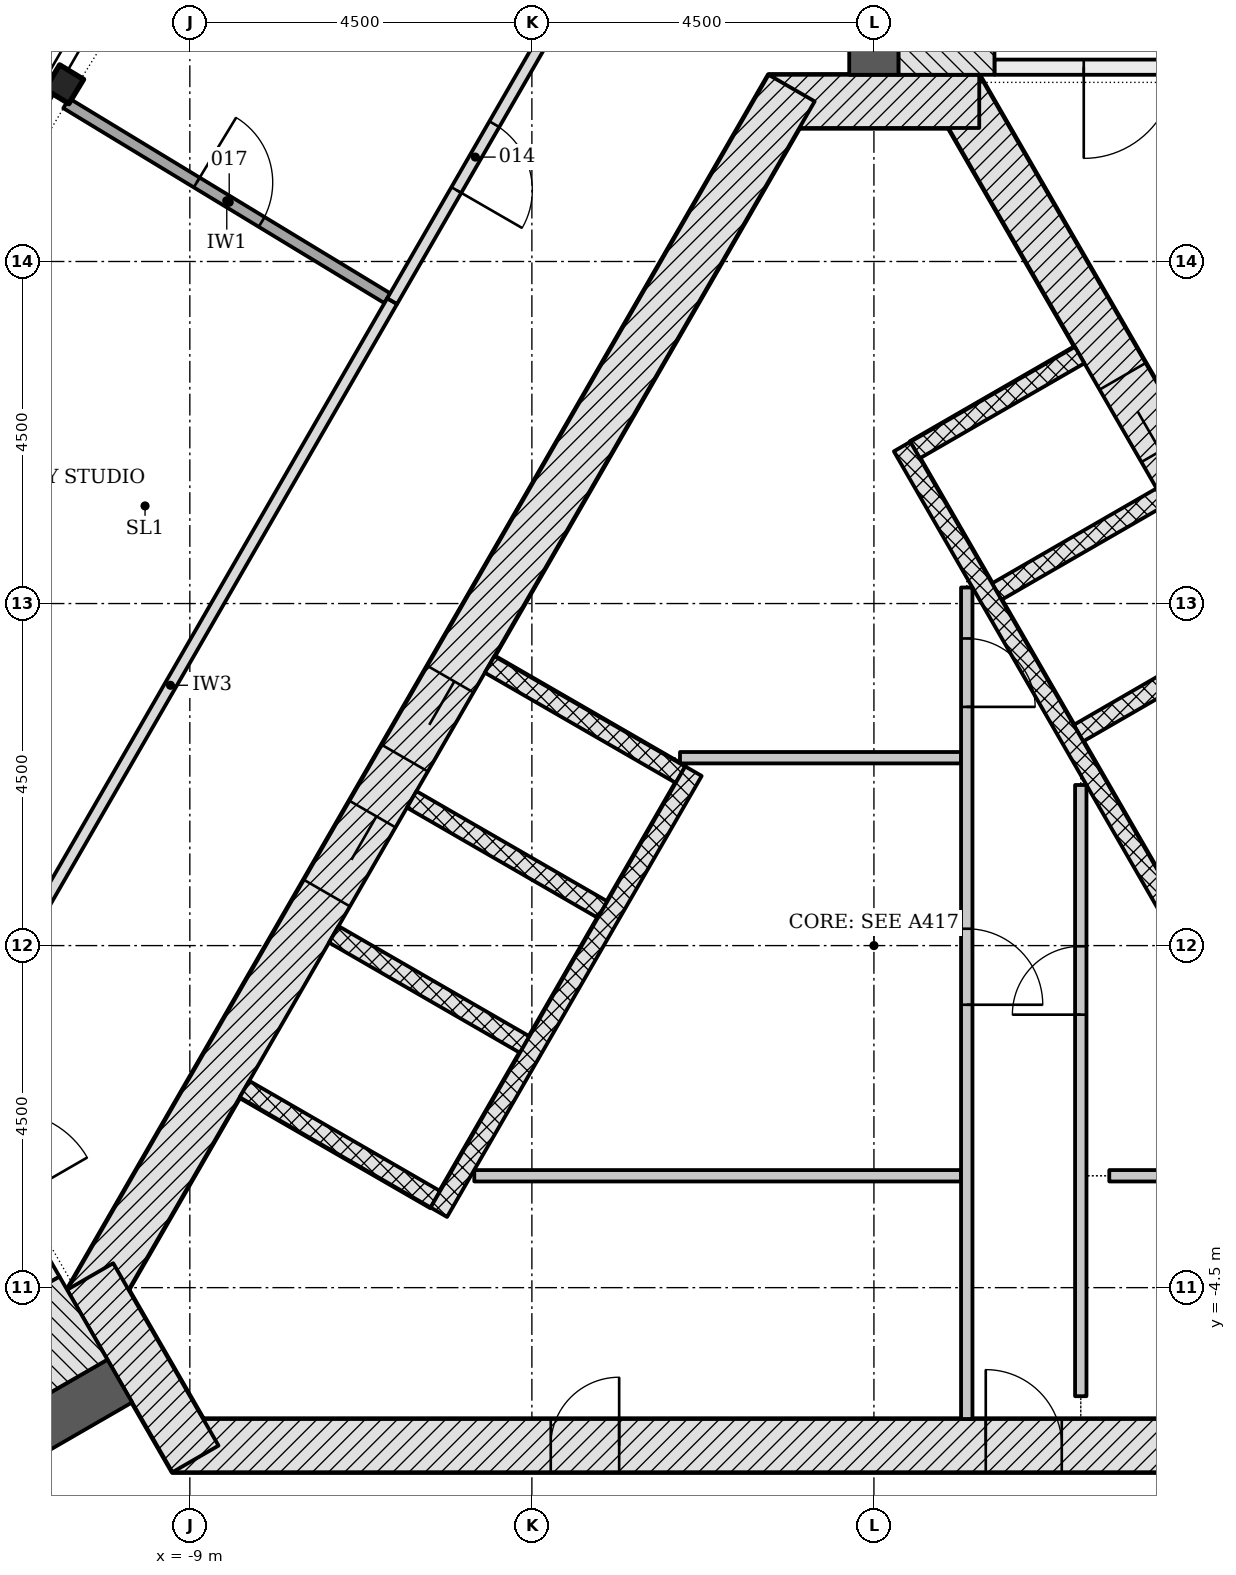
"""IFC4 building model, lengths in metres.
Left out: names, types, materials, properties, quantities, classifications, styles, units other than length and angle.
Written with IfcOpenShell. Run it as: python <this file> out.ifc"""

import sys

from ifc_helpers import new_model, si_unit, direction, frame, frame_2d, origin, origin_2d, place, context, subcontext, project, spatial, rectangle, i_section, extrude, element, fill, save


model = new_model("IFC4")
c1 = context("Model", 3, precision=1e-05, world=origin(), true_north=direction((0.0, 1.0)))
c2 = subcontext(c1, "Body", "Model", "MODEL_VIEW")
j1 = project(units=[si_unit("LENGTHUNIT", "METRE"), si_unit("PLANEANGLEUNIT", "RADIAN")], contexts=[c1])
p1 = place(None, origin())
s1 = spatial("IfcSite", under=j1, at=p1, CompositionType="ELEMENT")
p2 = place(p1, origin())
s2 = spatial("IfcBuilding", under=s1, at=p2, CompositionType="ELEMENT")
p3 = place(p2, frame((0.0, 0.0, 222.0)))
s3 = spatial("IfcBuildingStorey", under=s2, at=p3, CompositionType="ELEMENT", Elevation=222.0)
p4 = place(p3, frame((-9.229, -6.578, -0.2), z_axis=(0.0, 0.0, 1.0), x_axis=(1.0, 0.0, 0.0)))
e1 = element("IfcWall", 1, at=p4, inside=s3, PredefinedType="SHEAR", context=c2, shape_type="SweptSolid", body=[
    extrude(rectangle(XDim=18.458, YDim=0.7, at=frame_2d((9.229, 0.0))), origin(), (0.0, 0.0, 1.0), 3.6),
])
p5 = place(p4, frame((10.7, 0.0, 0.2)))
e2 = element("IfcOpeningElement", 2, at=p5, cuts=e1, PredefinedType="OPENING", context=c2, shape_type="SweptSolid", body=[
    extrude(rectangle(XDim=1.0, YDim=2.1, at=frame_2d((0.5, 1.05))), frame((0.0, 0.36, 0.0), z_axis=(0.0, -1.0, 0.0), x_axis=(1.0, 0.0, 0.0)), (0.0, 0.0, 1.0), 0.72),
])
p6 = place(p4, frame((4.977, 0.0, 0.2)))
e3 = element("IfcOpeningElement", 3, at=p6, cuts=e1, PredefinedType="OPENING", context=c2, shape_type="SweptSolid", body=[
    extrude(rectangle(XDim=0.9, YDim=2.1, at=frame_2d((0.45, 1.05))), frame((0.0, 0.36, 0.0), z_axis=(0.0, -1.0, 0.0), x_axis=(1.0, 0.0, 0.0)), (0.0, 0.0, 1.0), 0.72),
])
p7 = place(p4, frame((14.552, 0.0, 0.2)))
e4 = element("IfcOpeningElement", 4, at=p7, cuts=e1, PredefinedType="OPENING", context=c2, shape_type="SweptSolid", body=[
    extrude(rectangle(XDim=0.9, YDim=2.1, at=frame_2d((0.45, 1.05))), frame((0.0, 0.36, 0.0), z_axis=(0.0, -1.0, 0.0), x_axis=(1.0, 0.0, 0.0)), (0.0, 0.0, 1.0), 0.72),
])
p8 = place(p3, frame((10.311, -4.703, -0.2), z_axis=(0.0, 0.0, 1.0), x_axis=(-0.500001446645, 0.866024568562, 0.0)))
e5 = element("IfcWall", 5, at=p8, inside=s3, PredefinedType="SHEAR", context=c2, shape_type="SweptSolid", body=[
    extrude(rectangle(XDim=18.458, YDim=0.7, at=frame_2d((9.229, 0.0))), origin(), (0.0, 0.0, 1.0), 3.6),
])
p9 = place(p8, frame((4.379, 0.0, 0.2)))
e6 = element("IfcOpeningElement", 6, at=p9, cuts=e5, PredefinedType="OPENING", context=c2, shape_type="SweptSolid", body=[
    extrude(rectangle(XDim=1.1, YDim=2.1, at=frame_2d((0.55, 1.05))), frame((0.0, 0.36, 0.0), z_axis=(0.0, -1.0, 0.0), x_axis=(1.0, 0.0, 0.0)), (0.0, 0.0, 1.0), 0.72),
])
p10 = place(p8, frame((6.529, 0.0, 0.2)))
e7 = element("IfcOpeningElement", 7, at=p10, cuts=e5, PredefinedType="OPENING", context=c2, shape_type="SweptSolid", body=[
    extrude(rectangle(XDim=1.1, YDim=2.1, at=frame_2d((0.55, 1.05))), frame((0.0, 0.36, 0.0), z_axis=(0.0, -1.0, 0.0), x_axis=(1.0, 0.0, 0.0)), (0.0, 0.0, 1.0), 0.72),
])
p11 = place(p8, frame((8.679, 0.0, 0.2)))
e8 = element("IfcOpeningElement", 8, at=p11, cuts=e5, PredefinedType="OPENING", context=c2, shape_type="SweptSolid", body=[
    extrude(rectangle(XDim=1.1, YDim=2.1, at=frame_2d((0.55, 1.05))), frame((0.0, 0.36, 0.0), z_axis=(0.0, -1.0, 0.0), x_axis=(1.0, 0.0, 0.0)), (0.0, 0.0, 1.0), 0.72),
])
p12 = place(p8, frame((10.829, 0.0, 0.2)))
e9 = element("IfcOpeningElement", 9, at=p12, cuts=e5, PredefinedType="OPENING", context=c2, shape_type="SweptSolid", body=[
    extrude(rectangle(XDim=1.1, YDim=2.1, at=frame_2d((0.55, 1.05))), frame((0.0, 0.36, 0.0), z_axis=(0.0, -1.0, 0.0), x_axis=(1.0, 0.0, 0.0)), (0.0, 0.0, 1.0), 0.72),
])
p13 = place(p8, frame((12.979, 0.0, 0.2)))
e10 = element("IfcOpeningElement", 10, at=p13, cuts=e5, PredefinedType="OPENING", context=c2, shape_type="SweptSolid", body=[
    extrude(rectangle(XDim=1.1, YDim=2.1, at=frame_2d((0.55, 1.05))), frame((0.0, 0.36, 0.0), z_axis=(0.0, -1.0, 0.0), x_axis=(1.0, 0.0, 0.0)), (0.0, 0.0, 1.0), 0.72),
])
p14 = place(p3, frame((1.386, 11.106, -0.2), z_axis=(0.0, 0.0, 1.0), x_axis=(-1.0, 0.0, 0.0)))
e11 = element("IfcWall", 11, at=p14, inside=s3, PredefinedType="SHEAR", context=c2, shape_type="SweptSolid", body=[
    extrude(rectangle(XDim=2.771, YDim=0.7, at=frame_2d((1.386, 0.0))), origin(), (0.0, 0.0, 1.0), 3.6),
])
p15 = place(p3, frame((-1.083, 11.281, -0.2), z_axis=(0.0, 0.0, 1.0), x_axis=(-0.500001446645, -0.866024568562, 0.0)))
e12 = element("IfcWall", 12, at=p15, inside=s3, PredefinedType="SHEAR", context=c2, shape_type="SweptSolid", body=[
    extrude(rectangle(XDim=18.458, YDim=0.7, at=frame_2d((9.229, 0.0))), origin(), (0.0, 0.0, 1.0), 3.6),
])
p16 = place(p15, frame((8.979, 0.0, 0.2)))
e13 = element("IfcOpeningElement", 13, at=p16, cuts=e12, PredefinedType="OPENING", context=c2, shape_type="SweptSolid", body=[
    extrude(rectangle(XDim=1.2, YDim=2.1, at=frame_2d((0.6, 1.05))), frame((0.0, 0.36, 0.0), z_axis=(0.0, -1.0, 0.0), x_axis=(1.0, 0.0, 0.0)), (0.0, 0.0, 1.0), 0.72),
])
p17 = place(p15, frame((11.029, 0.0, 0.2)))
e14 = element("IfcOpeningElement", 14, at=p17, cuts=e12, PredefinedType="OPENING", context=c2, shape_type="SweptSolid", body=[
    extrude(rectangle(XDim=1.2, YDim=2.1, at=frame_2d((0.6, 1.05))), frame((0.0, 0.36, 0.0), z_axis=(0.0, -1.0, 0.0), x_axis=(1.0, 0.0, 0.0)), (0.0, 0.0, 1.0), 0.72),
])
p18 = place(p3, frame((-10.311, -4.353, -0.2), z_axis=(0.0, 0.0, 1.0), x_axis=(0.500042739161, -0.866000726912, 0.0)))
e15 = element("IfcWall", 15, at=p18, inside=s3, PredefinedType="SHEAR", context=c2, shape_type="SweptSolid", body=[
    extrude(rectangle(XDim=2.771, YDim=0.7, at=frame_2d((1.386, 0.0))), origin(), (0.0, 0.0, 1.0), 3.6),
])
for number, where, z_axis, x_axis in (
    (16, (0.0, 11.456, -0.2), (0.0, 0.0, 1.0), (0.0, 1.0, 0.0)),
    (17, (-9.922, -5.728, -0.2), (0.0, 0.0, 1.0), (-0.866, -0.5, 0.0)),
):
    element("IfcWall", number, at=place(p3, frame(where, z_axis=z_axis, x_axis=x_axis)), inside=s3, PredefinedType="SHEAR", context=c2, shape_type="SweptSolid", body=[
        extrude(rectangle(XDim=8.359, YDim=0.65, at=frame_2d((4.179, 0.0))), origin(), (0.0, 0.0, 1.0), 3.6),
    ])
p19 = place(p3, frame((-10.652, 11.332, -0.2), z_axis=(0.0, 0.0, 1.0), x_axis=(-0.519044082631, -0.854747471647, 0.0)))
e18 = element("IfcColumn", 18, at=p19, inside=s3, PredefinedType="COLUMN", context=c2, shape_type="SweptSolid", body=[
    extrude(i_section(OverallWidth=0.373, OverallDepth=0.368, WebThickness=0.015, FlangeThickness=0.024, FilletRadius=0.015, at=origin_2d()), origin(), (0.0, 0.0, 1.0), 3.6),
])
p20 = place(p3, frame((5.931, 2.183, -0.2), z_axis=(0.0, 0.0, 1.0), x_axis=(-0.866047370643, -0.499961950354, 0.0)))
e19 = element("IfcWall", 19, at=p20, inside=s3, PredefinedType="PARTITIONING", context=c2, shape_type="SweptSolid", body=[
    extrude(rectangle(XDim=2.5, YDim=0.25, at=frame_2d((1.25, 0.0))), origin(), (0.0, 0.0, 1.0), 3.6),
])
for number, where, z_axis, x_axis in (
    (20, (4.856, 4.045, -0.2), (0.0, 0.0, 1.0), (-0.866, -0.5, 0.0)),
    (21, (3.781, 5.907, -0.2), (0.0, 0.0, 1.0), (-0.866, -0.5, 0.0)),
    (22, (2.706, 7.769, -0.2), (0.0, 0.0, 1.0), (-0.866, -0.5, 0.0)),
):
    element("IfcWall", number, at=place(p3, frame(where, z_axis=z_axis, x_axis=x_axis)), inside=s3, PredefinedType="PARTITIONING", context=c2, shape_type="SweptSolid", body=[
        extrude(rectangle(XDim=2.5, YDim=0.25, at=frame_2d((1.25, 0.0))), origin(), (0.0, 0.0, 1.0), 3.6),
    ])
p21 = place(p3, frame((5.87, -2.961, 0.0), z_axis=(0.0, 0.0, 1.0), x_axis=(-0.50000615651, 0.866021849293, 0.0)))
e23 = element("IfcWall", 23, at=p21, inside=s3, PredefinedType="PARTITIONING", context=c2, shape_type="SweptSolid", body=[
    extrude(rectangle(XDim=11.0, YDim=0.25, at=frame_2d((5.5, 0.0))), origin(), (0.0, 0.0, 1.0), 3.4),
])
for number, where, z_axis, x_axis in (
    (24, (-5.056, 3.699, -0.2), (0.0, 0.0, 1.0), (0.866, -0.5, 0.0)),
    (25, (-6.081, 1.923, -0.2), (0.0, 0.0, 1.0), (0.866, -0.5, 0.0)),
    (26, (-7.106, 0.148, -0.2), (0.0, 0.0, 1.0), (0.866, -0.5, 0.0)),
    (27, (-8.281, -1.887, -0.2), (0.0, 0.0, 1.0), (0.866, -0.5, 0.0)),
):
    element("IfcWall", number, at=place(p3, frame(where, z_axis=z_axis, x_axis=x_axis)), inside=s3, PredefinedType="PARTITIONING", context=c2, shape_type="SweptSolid", body=[
        extrude(rectangle(XDim=2.9, YDim=0.25, at=frame_2d((1.45, 0.0))), origin(), (0.0, 0.0, 1.0), 3.6),
    ])
p22 = place(p3, frame((-2.374, 2.294, 0.0), z_axis=(0.0, 0.0, 1.0), x_axis=(-0.500003174267, -0.866023571113, 0.0)))
e28 = element("IfcWall", 28, at=p22, inside=s3, PredefinedType="PARTITIONING", context=c2, shape_type="SweptSolid", body=[
    extrude(rectangle(XDim=6.7, YDim=0.25, at=frame_2d((3.35, 0.0))), origin(), (0.0, 0.0, 1.0), 3.4),
])
p23 = place(p3, frame((-5.258, -3.028, 0.0), z_axis=(0.0, 0.0, 1.0), x_axis=(1.0, 0.0, 0.0)))
e29 = element("IfcWall", 29, at=p23, inside=s3, PredefinedType="PARTITIONING", context=c2, shape_type="SweptSolid", body=[
    extrude(rectangle(XDim=6.404, YDim=0.15, at=frame_2d((3.202, 0.0))), origin(), (0.0, 0.0, 1.0), 3.4),
])
p24 = place(p3, frame((-2.551, 2.472, 0.0), z_axis=(0.0, 0.0, 1.0), x_axis=(1.0, 0.0, 0.0)))
e30 = element("IfcWall", 30, at=p24, inside=s3, PredefinedType="PARTITIONING", context=c2, shape_type="SweptSolid", body=[
    extrude(rectangle(XDim=3.698, YDim=0.15, at=frame_2d((1.849, 0.0))), origin(), (0.0, 0.0, 1.0), 3.4),
])
p25 = place(p3, frame((1.221, 4.711, 0.0), z_axis=(0.0, 0.0, 1.0), x_axis=(0.0, -1.0, 0.0)))
e31 = element("IfcWall", 31, at=p25, inside=s3, PredefinedType="PARTITIONING", context=c2, shape_type="SweptSolid", body=[
    extrude(rectangle(XDim=10.939, YDim=0.15, at=frame_2d((5.47, 0.0))), origin(), (0.0, 0.0, 1.0), 3.4),
])
p26 = place(p25, frame((4.489, 0.0, 0.0)))
e32 = element("IfcOpeningElement", 32, at=p26, cuts=e31, PredefinedType="OPENING", context=c2, shape_type="SweptSolid", body=[
    extrude(rectangle(XDim=1.0, YDim=2.1, at=frame_2d((0.5, 1.05))), frame((0.0, 0.085, 0.0), z_axis=(0.0, -1.0, 0.0), x_axis=(1.0, 0.0, 0.0)), (0.0, 0.0, 1.0), 0.17),
])
p27 = place(p25, frame((0.671, 0.0, 0.0)))
e33 = element("IfcOpeningElement", 33, at=p27, cuts=e31, PredefinedType="OPENING", context=c2, shape_type="SweptSolid", body=[
    extrude(rectangle(XDim=0.9, YDim=2.1, at=frame_2d((0.45, 1.05))), frame((0.0, 0.085, 0.0), z_axis=(0.0, -1.0, 0.0), x_axis=(1.0, 0.0, 0.0)), (0.0, 0.0, 1.0), 0.17),
])
p28 = place(p3, frame((2.721, -5.928, 0.0), z_axis=(0.0, 0.0, 1.0), x_axis=(0.0, 1.0, 0.0)))
e34 = element("IfcWall", 34, at=p28, inside=s3, PredefinedType="PARTITIONING", context=c2, shape_type="SweptSolid", body=[
    extrude(rectangle(XDim=8.041, YDim=0.15, at=frame_2d((4.021, 0.0))), origin(), (0.0, 0.0, 1.0), 3.4),
])
p29 = place(p28, frame((5.02, 0.0, 0.0)))
e35 = element("IfcOpeningElement", 35, at=p29, cuts=e34, PredefinedType="OPENING", context=c2, shape_type="SweptSolid", body=[
    extrude(rectangle(XDim=0.9, YDim=2.1, at=frame_2d((0.45, 1.05))), frame((0.0, 0.085, 0.0), z_axis=(0.0, -1.0, 0.0), x_axis=(1.0, 0.0, 0.0)), (0.0, 0.0, 1.0), 0.17),
])
p30 = place(p3, frame((3.096, -3.028, 0.0), z_axis=(0.0, 0.0, 1.0), x_axis=(1.0, 0.0, 0.0)))
e36 = element("IfcWall", 36, at=p30, inside=s3, PredefinedType="PARTITIONING", context=c2, shape_type="SweptSolid", body=[
    extrude(rectangle(XDim=5.544, YDim=0.15, at=frame_2d((2.772, 0.0))), origin(), (0.0, 0.0, 1.0), 3.4),
])
p31 = place(p3, frame((5.135, 11.556, -0.2), z_axis=(0.0, 0.0, 1.0), x_axis=(-1.0, 0.0, 0.0)))
e37 = element("IfcWall", 37, at=p31, inside=s3, PredefinedType="SHEAR", context=c2, shape_type="SweptSolid", body=[
    extrude(rectangle(XDim=3.55, YDim=0.2, at=frame_2d((1.775, 0.0))), origin(), (0.0, 0.0, 1.0), 3.6),
])
p32 = place(p31, frame((1.175, 0.0, 0.2)))
e38 = element("IfcOpeningElement", 38, at=p32, cuts=e37, PredefinedType="OPENING", context=c2, shape_type="SweptSolid", body=[
    extrude(rectangle(XDim=1.2, YDim=2.1, at=frame_2d((0.6, 1.05))), frame((0.0, 0.11, 0.0), z_axis=(0.0, -1.0, 0.0), x_axis=(1.0, 0.0, 0.0)), (0.0, 0.0, 1.0), 0.22),
])
p33 = place(p3, frame((0.955, 11.456, -0.2), z_axis=(0.0, 0.0, 1.0), x_axis=(0.0, 1.0, 0.0)))
e39 = element("IfcWall", 39, at=p33, inside=s3, PredefinedType="SHEAR", context=c2, shape_type="SweptSolid", body=[
    extrude(rectangle(XDim=7.2, YDim=1.261, at=frame_2d((3.6, 0.0))), origin(), (0.0, 0.0, 1.0), 3.6),
])
p34 = place(p3, frame((-12.576, -1.331, -0.2), z_axis=(0.0, 0.0, 1.0), x_axis=(0.499970499736, -0.8660424351, 0.0)))
e40 = element("IfcWall", 40, at=p34, inside=s3, PredefinedType="SHEAR", context=c2, shape_type="SweptSolid", body=[
    extrude(rectangle(XDim=3.55, YDim=0.2, at=frame_2d((1.775, 0.0))), origin(), (0.0, 0.0, 1.0), 3.6),
])
p35 = place(p34, frame((1.175, 0.0, 0.2)))
e41 = element("IfcOpeningElement", 41, at=p35, cuts=e40, PredefinedType="OPENING", context=c2, shape_type="SweptSolid", body=[
    extrude(rectangle(XDim=1.2, YDim=2.1, at=frame_2d((0.6, 1.05))), frame((0.0, 0.11, 0.0), z_axis=(0.0, -1.0, 0.0), x_axis=(1.0, 0.0, 0.0)), (0.0, 0.0, 1.0), 0.22),
])
p36 = place(p3, frame((-10.399, -4.901, -0.2), z_axis=(0.0, 0.0, 1.0), x_axis=(-0.866018442252, -0.500012057535, 0.0)))
e42 = element("IfcWall", 42, at=p36, inside=s3, PredefinedType="SHEAR", context=c2, shape_type="SweptSolid", body=[
    extrude(rectangle(XDim=7.2, YDim=1.261, at=frame_2d((3.6, 0.0))), origin(), (0.0, 0.0, 1.0), 3.6),
])
p37 = place(p3, frame((-6.338, 8.478, 0.0), z_axis=(0.0, 0.0, 1.0), x_axis=(-0.499993497815, -0.86602915779, 0.0)))
e43 = element("IfcWall", 43, at=p37, inside=s3, PredefinedType="PARTITIONING", context=c2, shape_type="SweptSolid", body=[
    extrude(rectangle(XDim=11.67, YDim=0.15, at=frame_2d((5.835, 0.0))), origin(), (0.0, 0.0, 1.0), 2.852),
])
p38 = place(p3, frame((-10.626, 11.082, 0.0), z_axis=(0.0, 0.0, 1.0), x_axis=(0.854742891139, -0.519051625609, 0.0)))
e44 = element("IfcWall", 44, at=p38, inside=s3, PredefinedType="PARTITIONING", context=c2, shape_type="SweptSolid", body=[
    extrude(rectangle(XDim=4.941, YDim=0.15, at=frame_2d((2.471, 0.0))), origin(), (0.0, 0.0, 1.0), 3.4),
])
p39 = place(p38, frame((2.008, 0.0, 0.0)))
e45 = element("IfcOpeningElement", 45, at=p39, cuts=e44, PredefinedType="OPENING", context=c2, shape_type="SweptSolid", body=[
    extrude(rectangle(XDim=1.0, YDim=2.1, at=frame_2d((0.5, 1.05))), frame((0.0, 0.085, 0.0), z_axis=(0.0, -1.0, 0.0), x_axis=(1.0, 0.0, 0.0)), (0.0, 0.0, 1.0), 0.17),
])
p40 = place(p3, frame((-4.15, 12.269, 0.0), z_axis=(0.0, 0.0, 1.0), x_axis=(-0.499996027077, -0.86602769754, 0.0)))
e46 = element("IfcWall", 46, at=p40, inside=s3, PredefinedType="PARTITIONING", context=c2, shape_type="SweptSolid", body=[
    extrude(rectangle(XDim=4.377, YDim=0.15, at=frame_2d((2.189, 0.0))), origin(), (0.0, 0.0, 1.0), 2.852),
])
p41 = place(p40, frame((1.689, 0.0, 0.0)))
e47 = element("IfcOpeningElement", 47, at=p41, cuts=e46, PredefinedType="OPENING", context=c2, shape_type="SweptSolid", body=[
    extrude(rectangle(XDim=1.0, YDim=2.1, at=frame_2d((0.5, 1.05))), frame((0.0, 0.085, 0.0), z_axis=(0.0, -1.0, 0.0), x_axis=(1.0, 0.0, 0.0)), (0.0, 0.0, 1.0), 0.17),
])
p42 = place(p13, origin())
e48 = element("IfcDoor", 48, at=p42, inside=s3, OperationType="DOUBLE_DOOR_SLIDING", PredefinedType="DOOR", context=c2, shape_type="SweptSolid", body=[
    extrude(rectangle(XDim=1.1, YDim=2.1, at=frame_2d((0.55, 1.05))), frame((0.0, 0.025, 0.0), z_axis=(0.0, -1.0, 0.0), x_axis=(1.0, 0.0, 0.0)), (0.0, 0.0, 1.0), 0.05),
])
fill(e10, e48)
p43 = place(p16, origin())
e49 = element("IfcDoor", 49, at=p43, inside=s3, OperationType="DOUBLE_DOOR_SLIDING", PredefinedType="DOOR", context=c2, shape_type="SweptSolid", body=[
    extrude(rectangle(XDim=1.2, YDim=2.1, at=frame_2d((0.6, 1.05))), frame((0.0, 0.025, 0.0), z_axis=(0.0, -1.0, 0.0), x_axis=(1.0, 0.0, 0.0)), (0.0, 0.0, 1.0), 0.05),
])
fill(e13, e49)
p44 = place(p17, origin())
e50 = element("IfcDoor", 50, at=p44, inside=s3, OperationType="DOUBLE_DOOR_SLIDING", PredefinedType="DOOR", context=c2, shape_type="SweptSolid", body=[
    extrude(rectangle(XDim=1.2, YDim=2.1, at=frame_2d((0.6, 1.05))), frame((0.0, 0.025, 0.0), z_axis=(0.0, -1.0, 0.0), x_axis=(1.0, 0.0, 0.0)), (0.0, 0.0, 1.0), 0.05),
])
fill(e14, e50)
p45 = place(p5, origin())
e51 = element("IfcDoor", 51, at=p45, inside=s3, OperationType="SINGLE_SWING_LEFT", PredefinedType="DOOR", context=c2, shape_type="SweptSolid", body=[
    extrude(rectangle(XDim=1.0, YDim=2.1, at=frame_2d((0.5, 1.05))), frame((0.0, 0.075, 0.0), z_axis=(0.0, -1.0, 0.0), x_axis=(1.0, 0.0, 0.0)), (0.0, 0.0, 1.0), 0.15),
])
fill(e2, e51)
p46 = place(p6, origin())
e52 = element("IfcDoor", 52, at=p46, inside=s3, OperationType="SINGLE_SWING_RIGHT", PredefinedType="DOOR", context=c2, shape_type="SweptSolid", body=[
    extrude(rectangle(XDim=0.9, YDim=2.1, at=frame_2d((0.45, 1.05))), frame((0.0, 0.075, 0.0), z_axis=(0.0, -1.0, 0.0), x_axis=(1.0, 0.0, 0.0)), (0.0, 0.0, 1.0), 0.15),
])
fill(e3, e52)
p47 = place(p26, origin())
e53 = element("IfcDoor", 53, at=p47, inside=s3, OperationType="SINGLE_SWING_RIGHT", PredefinedType="DOOR", context=c2, shape_type="SweptSolid", body=[
    extrude(rectangle(XDim=1.0, YDim=2.1, at=frame_2d((0.5, 1.05))), frame((0.0, 0.025, 0.0), z_axis=(0.0, -1.0, 0.0), x_axis=(1.0, 0.0, 0.0)), (0.0, 0.0, 1.0), 0.05),
])
fill(e32, e53)
p48 = place(p29, origin())
e54 = element("IfcDoor", 54, at=p48, inside=s3, OperationType="SINGLE_SWING_LEFT", PredefinedType="DOOR", context=c2, shape_type="SweptSolid", body=[
    extrude(rectangle(XDim=0.9, YDim=2.1, at=frame_2d((0.45, 1.05))), frame((0.0, 0.025, 0.0), z_axis=(0.0, -1.0, 0.0), x_axis=(1.0, 0.0, 0.0)), (0.0, 0.0, 1.0), 0.05),
])
fill(e35, e54)
p49 = place(p27, origin())
e55 = element("IfcDoor", 55, at=p49, inside=s3, OperationType="SINGLE_SWING_RIGHT", PredefinedType="DOOR", context=c2, shape_type="SweptSolid", body=[
    extrude(rectangle(XDim=0.9, YDim=2.1, at=frame_2d((0.45, 1.05))), frame((0.0, 0.025, 0.0), z_axis=(0.0, -1.0, 0.0), x_axis=(1.0, 0.0, 0.0)), (0.0, 0.0, 1.0), 0.05),
])
fill(e33, e55)
p50 = place(p32, origin())
e56 = element("IfcDoor", 56, at=p50, inside=s3, OperationType="SINGLE_SWING_RIGHT", PredefinedType="DOOR", context=c2, shape_type="SweptSolid", body=[
    extrude(rectangle(XDim=1.2, YDim=2.1, at=frame_2d((0.6, 1.05))), frame((0.0, 0.025, 0.0), z_axis=(0.0, -1.0, 0.0), x_axis=(1.0, 0.0, 0.0)), (0.0, 0.0, 1.0), 0.05),
])
fill(e38, e56)
p51 = place(p41, origin())
e57 = element("IfcDoor", 57, at=p51, inside=s3, OperationType="SINGLE_SWING_RIGHT", PredefinedType="DOOR", context=c2, shape_type="SweptSolid", body=[
    extrude(rectangle(XDim=1.0, YDim=2.1, at=frame_2d((0.5, 1.05))), frame((0.0, 0.025, 0.0), z_axis=(0.0, -1.0, 0.0), x_axis=(1.0, 0.0, 0.0)), (0.0, 0.0, 1.0), 0.05),
])
fill(e47, e57)
p52 = place(p39, origin())
e58 = element("IfcDoor", 58, at=p52, inside=s3, OperationType="SINGLE_SWING_LEFT", PredefinedType="DOOR", context=c2, shape_type="SweptSolid", body=[
    extrude(rectangle(XDim=1.0, YDim=2.1, at=frame_2d((0.5, 1.05))), frame((0.0, 0.025, 0.0), z_axis=(0.0, -1.0, 0.0), x_axis=(1.0, 0.0, 0.0)), (0.0, 0.0, 1.0), 0.05),
])
fill(e45, e58)
save(model, sys.argv[1])
